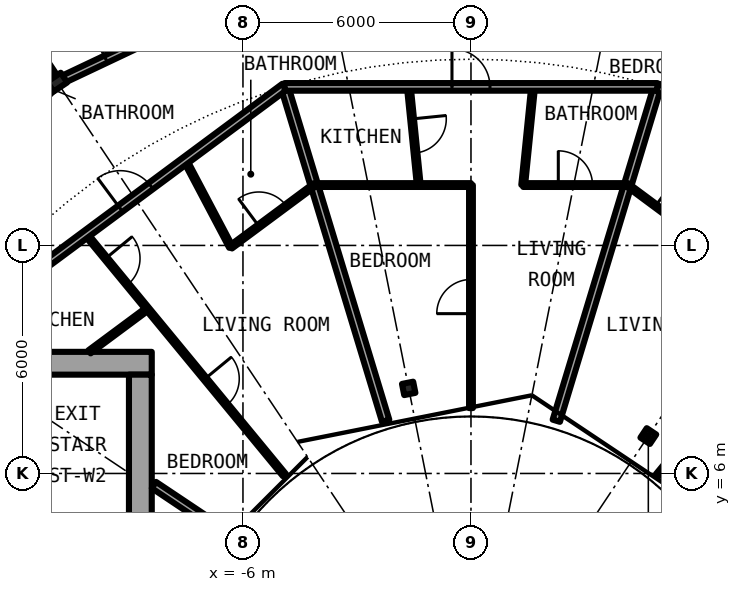
"""IFC4 building model, lengths in metres.
Left out: names, types, materials, properties, quantities, classifications, styles, units other than length and angle.
Written with IfcOpenShell. Run it as: python <this file> out.ifc"""

import sys

from ifc_helpers import new_model, si_unit, direction, frame, frame_2d, origin, origin_2d, place, context, subcontext, project, spatial, rectangle, i_section, extrude, element, fill, save


model = new_model("IFC4")
c1 = context("Model", 3, precision=1e-05, world=origin(), true_north=direction((0.0, 1.0)))
c2 = subcontext(c1, "Body", "Model", "MODEL_VIEW")
j1 = project(units=[si_unit("LENGTHUNIT", "METRE"), si_unit("PLANEANGLEUNIT", "RADIAN")], contexts=[c1])
p1 = place(None, origin())
s1 = spatial("IfcSite", under=j1, at=p1, CompositionType="ELEMENT")
p2 = place(p1, origin())
s2 = spatial("IfcBuilding", under=s1, at=p2, CompositionType="ELEMENT")
p3 = place(p2, frame((0.0, 0.0, 120.8)))
s3 = spatial("IfcBuildingStorey", under=s2, at=p3, CompositionType="ELEMENT", Elevation=120.8)
p4 = place(p3, frame((-10.889, 16.297, 0.0), z_axis=(0.0, 0.0, 1.0), x_axis=(-0.55557023302, 0.831469612303, 0.0)))
e1 = element("IfcColumn", 1, at=p4, inside=s3, PredefinedType="COLUMN", context=c2, shape_type="SweptSolid", body=[
    extrude(i_section(OverallWidth=0.307, OverallDepth=0.432, WebThickness=0.021, FlangeThickness=0.04, FilletRadius=0.027, at=origin_2d()), origin(), (0.0, 0.0, 1.0), 3.05),
])
for number, where, z_axis, x_axis in (
    (2, (4.667, 6.984, 0.0), (0.0, 0.0, 1.0), (0.556, 0.831, 0.0)),
    (3, (-1.639, 8.239, 0.0), (0.0, 0.0, 1.0), (-0.195, 0.981, 0.0)),
):
    element("IfcColumn", number, at=place(p3, frame(where, z_axis=z_axis, x_axis=x_axis)), inside=s3, PredefinedType="COLUMN", context=c2, shape_type="SweptSolid", body=[
        extrude(i_section(OverallWidth=0.3, OverallDepth=0.3, WebThickness=0.011, FlangeThickness=0.019, FilletRadius=0.027, at=origin_2d()), origin(), (0.0, 0.0, 1.0), 3.05),
    ])
p5 = place(p3, frame((-8.4, 8.9, 0.0), z_axis=(0.0, 0.0, 1.0), x_axis=(-1.0, 0.0, 0.0)))
e4 = element("IfcWall", 4, at=p5, inside=s3, PredefinedType="SHEAR", context=c2, shape_type="SweptSolid", body=[
    extrude(rectangle(XDim=13.8, YDim=0.6, at=frame_2d((6.9, 0.0))), origin(), (0.0, 0.0, 1.0), 3.05),
])
p6 = place(p5, frame((11.475, 0.0, 0.0)))
e5 = element("IfcOpeningElement", 5, at=p6, cuts=e4, PredefinedType="OPENING", context=c2, shape_type="SweptSolid", body=[
    extrude(rectangle(XDim=1.2, YDim=2.3, at=frame_2d((0.6, 1.15))), frame((0.0, 0.31, 0.0), z_axis=(0.0, -1.0, 0.0), x_axis=(1.0, 0.0, 0.0)), (0.0, 0.0, 1.0), 0.62),
])
p7 = place(p3, frame((-8.7, 8.6, 0.0), z_axis=(0.0, 0.0, 1.0), x_axis=(0.0, -1.0, 0.0)))
e6 = element("IfcWall", 6, at=p7, inside=s3, PredefinedType="SHEAR", context=c2, shape_type="SweptSolid", body=[
    extrude(rectangle(XDim=17.2, YDim=0.6, at=frame_2d((8.6, 0.0))), origin(), (0.0, 0.0, 1.0), 3.05),
])
p8 = place(p7, frame((7.4, 0.0, 0.1)))
e7 = element("IfcOpeningElement", 7, at=p8, cuts=e6, PredefinedType="OPENING", context=c2, shape_type="SweptSolid", body=[
    extrude(rectangle(XDim=2.4, YDim=2.2, at=frame_2d((1.2, 1.1))), frame((0.0, 0.31, 0.0), z_axis=(0.0, -1.0, 0.0), x_axis=(1.0, 0.0, 0.0)), (0.0, 0.0, 1.0), 0.62),
])
for number, where, z_axis, x_axis in (
    (8, (-4.907, 16.172, 0.0), (0.0, 0.0, 1.0), (0.29, -0.957, 0.0)),
    (9, (2.245, 7.387, 0.0), (0.0, 0.0, 1.0), (0.29, 0.957, 0.0)),
):
    element("IfcWall", number, at=place(p3, frame(where, z_axis=z_axis, x_axis=x_axis)), inside=s3, PredefinedType="PARTITIONING", context=c2, shape_type="SweptSolid", body=[
        extrude(rectangle(XDim=9.18, YDim=0.2, at=frame_2d((4.59, 0.0))), origin(), (0.0, 0.0, 1.0), 2.7),
    ])
p9 = place(p3, frame((-15.097, 22.595, 0.0), z_axis=(0.0, 0.0, 1.0), x_axis=(0.555572791, -0.831467903109, 0.0)))
e10 = element("IfcWall", 10, at=p9, inside=s3, PredefinedType="PARTITIONING", context=c2, shape_type="SweptSolid", body=[
    extrude(rectangle(XDim=7.358, YDim=0.2, at=frame_2d((3.679, 0.0))), origin(), (0.0, 0.0, 1.0), 2.7),
])
p10 = place(p3, frame((-10.132, 12.296, 0.0), z_axis=(0.0, 0.0, 1.0), x_axis=(0.635976043025, -0.771708800454, 0.0)))
e11 = element("IfcWall", 11, at=p10, inside=s3, PredefinedType="PARTITIONING", context=c2, shape_type="SweptSolid", body=[
    extrude(rectangle(XDim=8.213, YDim=0.1, at=frame_2d((4.106, 0.0))), origin(), (0.0, 0.0, 1.0), 2.7),
])
p11 = place(p10, frame((0.823, 0.0, 0.0)))
e12 = element("IfcOpeningElement", 12, at=p11, cuts=e11, PredefinedType="OPENING", context=c2, shape_type="SweptSolid", body=[
    extrude(rectangle(XDim=0.9, YDim=2.3, at=frame_2d((0.45, 1.15))), frame((0.0, 0.06, 0.0), z_axis=(0.0, -1.0, 0.0), x_axis=(1.0, 0.0, 0.0)), (0.0, 0.0, 1.0), 0.12),
])
p12 = place(p10, frame((4.929, 0.0, 0.0)))
e13 = element("IfcOpeningElement", 13, at=p12, cuts=e11, PredefinedType="OPENING", context=c2, shape_type="SweptSolid", body=[
    extrude(rectangle(XDim=0.9, YDim=2.3, at=frame_2d((0.45, 1.15))), frame((0.0, 0.06, 0.0), z_axis=(0.0, -1.0, 0.0), x_axis=(1.0, 0.0, 0.0)), (0.0, 0.0, 1.0), 0.12),
])
p13 = place(p3, frame((-7.519, 14.234, 0.0), z_axis=(0.0, 0.0, 1.0), x_axis=(0.467001992543, -0.884256263173, 0.0)))
e14 = element("IfcWall", 14, at=p13, inside=s3, PredefinedType="PARTITIONING", context=c2, shape_type="SweptSolid", body=[
    extrude(rectangle(XDim=2.572, YDim=0.1, at=frame_2d((1.286, 0.0))), origin(), (0.0, 0.0, 1.0), 2.7),
])
p14 = place(p3, frame((-1.635, 16.172, 0.0), z_axis=(0.0, 0.0, 1.0), x_axis=(0.100527855112, -0.994934244233, 0.0)))
e15 = element("IfcWall", 15, at=p14, inside=s3, PredefinedType="PARTITIONING", context=c2, shape_type="SweptSolid", body=[
    extrude(rectangle(XDim=2.596, YDim=0.1, at=frame_2d((1.298, 0.0))), origin(), (0.0, 0.0, 1.0), 2.7),
])
p15 = place(p14, frame((0.848, 0.0, 0.0)))
e16 = element("IfcOpeningElement", 16, at=p15, cuts=e15, PredefinedType="OPENING", context=c2, shape_type="SweptSolid", body=[
    extrude(rectangle(XDim=0.9, YDim=2.3, at=frame_2d((0.45, 1.15))), frame((0.0, 0.06, 0.0), z_axis=(0.0, -1.0, 0.0), x_axis=(1.0, 0.0, 0.0)), (0.0, 0.0, 1.0), 0.12),
])
p16 = place(p3, frame((0.0, 7.72, 0.0), z_axis=(0.0, 0.0, 1.0), x_axis=(0.0, 1.0, 0.0)))
e17 = element("IfcWall", 17, at=p16, inside=s3, PredefinedType="PARTITIONING", context=c2, shape_type="SweptSolid", body=[
    extrude(rectangle(XDim=5.869, YDim=0.1, at=frame_2d((2.935, 0.0))), origin(), (0.0, 0.0, 1.0), 2.7),
])
p17 = place(p16, frame((2.485, 0.0, 0.0)))
e18 = element("IfcOpeningElement", 18, at=p17, cuts=e17, PredefinedType="OPENING", context=c2, shape_type="SweptSolid", body=[
    extrude(rectangle(XDim=0.9, YDim=2.3, at=frame_2d((0.45, 1.15))), frame((0.0, 0.06, 0.0), z_axis=(0.0, -1.0, 0.0), x_axis=(1.0, 0.0, 0.0)), (0.0, 0.0, 1.0), 0.12),
])
p18 = place(p3, frame((1.374, 13.589, 0.0), z_axis=(0.0, 0.0, 1.0), x_axis=(0.100527855112, 0.994934244233, 0.0)))
e19 = element("IfcWall", 19, at=p18, inside=s3, PredefinedType="PARTITIONING", context=c2, shape_type="SweptSolid", body=[
    extrude(rectangle(XDim=2.596, YDim=0.1, at=frame_2d((1.298, 0.0))), origin(), (0.0, 0.0, 1.0), 2.7),
])
p19 = place(p3, frame((4.909, 5.958, 0.0), z_axis=(0.0, 0.0, 1.0), x_axis=(0.635976043025, 0.771708800454, 0.0)))
e20 = element("IfcWall", 20, at=p19, inside=s3, PredefinedType="PARTITIONING", context=c2, shape_type="SweptSolid", body=[
    extrude(rectangle(XDim=8.213, YDim=0.1, at=frame_2d((4.106, 0.0))), origin(), (0.0, 0.0, 1.0), 2.7),
])
p20 = place(p19, frame((6.49, 0.0, 0.0)))
e21 = element("IfcOpeningElement", 21, at=p20, cuts=e20, PredefinedType="OPENING", context=c2, shape_type="SweptSolid", body=[
    extrude(rectangle(XDim=0.9, YDim=2.3, at=frame_2d((0.45, 1.15))), frame((0.0, 0.06, 0.0), z_axis=(0.0, -1.0, 0.0), x_axis=(1.0, 0.0, 0.0)), (0.0, 0.0, 1.0), 0.12),
])
p21 = place(p19, frame((2.384, 0.0, 0.0)))
e22 = element("IfcOpeningElement", 22, at=p21, cuts=e20, PredefinedType="OPENING", context=c2, shape_type="SweptSolid", body=[
    extrude(rectangle(XDim=0.9, YDim=2.3, at=frame_2d((0.45, 1.15))), frame((0.0, 0.06, 0.0), z_axis=(0.0, -1.0, 0.0), x_axis=(1.0, 0.0, 0.0)), (0.0, 0.0, 1.0), 0.12),
])
p22 = place(p3, frame((-6.513, 4.472, 0.0), z_axis=(0.0, 0.0, 1.0), x_axis=(-0.831333375071, 0.555774072347, 0.0)))
e23 = element("IfcWall", 23, at=p22, inside=s3, PredefinedType="PARTITIONING", context=c2, shape_type="SweptSolid", body=[
    extrude(rectangle(XDim=2.203, YDim=0.2, at=frame_2d((1.101, 0.0))), origin(), (0.0, 0.0, 1.0), 2.7),
])
p23 = place(p3, frame((-10.039, 9.2, 0.0), z_axis=(0.0, 0.0, 1.0), x_axis=(0.803149591038, 0.595777420196, 0.0)))
e24 = element("IfcWall", 24, at=p23, inside=s3, PredefinedType="PARTITIONING", context=c2, shape_type="SweptSolid", body=[
    extrude(rectangle(XDim=1.9, YDim=0.1, at=frame_2d((0.95, 0.0))), origin(), (0.0, 0.0, 1.0), 2.7),
])
p24 = place(p3, frame((-6.318, 11.96, 0.0), z_axis=(0.0, 0.0, 1.0), x_axis=(0.803128348509, 0.595806055542, 0.0)))
e25 = element("IfcWall", 25, at=p24, inside=s3, PredefinedType="PARTITIONING", context=c2, shape_type="SweptSolid", body=[
    extrude(rectangle(XDim=2.734, YDim=0.1, at=frame_2d((1.367, 0.0))), origin(), (0.0, 0.0, 1.0), 2.7),
])
p25 = place(p24, frame((0.917, 0.0, 0.0)))
e26 = element("IfcOpeningElement", 26, at=p25, cuts=e25, PredefinedType="OPENING", context=c2, shape_type="SweptSolid", body=[
    extrude(rectangle(XDim=0.9, YDim=2.3, at=frame_2d((0.45, 1.15))), frame((0.0, 0.06, 0.0), z_axis=(0.0, -1.0, 0.0), x_axis=(1.0, 0.0, 0.0)), (0.0, 0.0, 1.0), 0.12),
])
p26 = place(p3, frame((4.122, 13.589, 0.0), z_axis=(0.0, 0.0, 1.0), x_axis=(0.803128348509, -0.595806055542, 0.0)))
e27 = element("IfcWall", 27, at=p26, inside=s3, PredefinedType="PARTITIONING", context=c2, shape_type="SweptSolid", body=[
    extrude(rectangle(XDim=2.734, YDim=0.1, at=frame_2d((1.367, 0.0))), origin(), (0.0, 0.0, 1.0), 2.7),
])
p27 = place(p26, frame((0.917, 0.0, 0.0)))
e28 = element("IfcOpeningElement", 28, at=p27, cuts=e27, PredefinedType="OPENING", context=c2, shape_type="SweptSolid", body=[
    extrude(rectangle(XDim=0.9, YDim=2.3, at=frame_2d((0.45, 1.15))), frame((0.0, 0.06, 0.0), z_axis=(0.0, -1.0, 0.0), x_axis=(1.0, 0.0, 0.0)), (0.0, 0.0, 1.0), 0.12),
])
p28 = place(p3, frame((-4.122, 13.589, 0.0), z_axis=(0.0, 0.0, 1.0), x_axis=(1.0, 0.0, 0.0)))
e29 = element("IfcWall", 29, at=p28, inside=s3, PredefinedType="PARTITIONING", context=c2, shape_type="SweptSolid", body=[
    extrude(rectangle(XDim=4.122, YDim=0.1, at=frame_2d((2.061, 0.0))), origin(), (0.0, 0.0, 1.0), 2.7),
])
p29 = place(p3, frame((1.374, 13.589, 0.0), z_axis=(0.0, 0.0, 1.0), x_axis=(1.0, 0.0, 0.0)))
e30 = element("IfcWall", 30, at=p29, inside=s3, PredefinedType="PARTITIONING", context=c2, shape_type="SweptSolid", body=[
    extrude(rectangle(XDim=2.748, YDim=0.1, at=frame_2d((1.374, 0.0))), origin(), (0.0, 0.0, 1.0), 2.7),
])
p30 = place(p29, frame((0.924, 0.0, 0.0)))
e31 = element("IfcOpeningElement", 31, at=p30, cuts=e30, PredefinedType="OPENING", context=c2, shape_type="SweptSolid", body=[
    extrude(rectangle(XDim=0.9, YDim=2.3, at=frame_2d((0.45, 1.15))), frame((0.0, 0.06, 0.0), z_axis=(0.0, -1.0, 0.0), x_axis=(1.0, 0.0, 0.0)), (0.0, 0.0, 1.0), 0.12),
])
p31 = place(p3, frame((-14.052, 9.389, 0.0), z_axis=(0.0, 0.0, 1.0), x_axis=(0.803204584823, 0.59570327758, 0.0)))
e32 = element("IfcWall", 32, at=p31, inside=s3, PredefinedType="PARTITIONING", context=c2, shape_type="SweptSolid", body=[
    extrude(rectangle(XDim=11.387, YDim=0.2, at=frame_2d((5.693, 0.0))), origin(), (0.0, 0.0, 1.0), 2.7),
])
p32 = place(p31, frame((6.007, 0.0, 0.0)))
e33 = element("IfcOpeningElement", 33, at=p32, cuts=e32, PredefinedType="OPENING", context=c2, shape_type="SweptSolid", body=[
    extrude(rectangle(XDim=1.0, YDim=2.3, at=frame_2d((0.5, 1.15))), frame((0.0, 0.11, 0.0), z_axis=(0.0, -1.0, 0.0), x_axis=(1.0, 0.0, 0.0)), (0.0, 0.0, 1.0), 0.22),
])
p33 = place(p3, frame((4.906, 16.172, 0.0), z_axis=(0.0, 0.0, 1.0), x_axis=(0.803204584823, -0.59570327758, 0.0)))
e34 = element("IfcWall", 34, at=p33, inside=s3, PredefinedType="PARTITIONING", context=c2, shape_type="SweptSolid", body=[
    extrude(rectangle(XDim=11.387, YDim=0.2, at=frame_2d((5.693, 0.0))), origin(), (0.0, 0.0, 1.0), 2.7),
])
p34 = place(p33, frame((4.38, 0.0, 0.0)))
e35 = element("IfcOpeningElement", 35, at=p34, cuts=e34, PredefinedType="OPENING", context=c2, shape_type="SweptSolid", body=[
    extrude(rectangle(XDim=1.0, YDim=2.3, at=frame_2d((0.5, 1.15))), frame((0.0, 0.11, 0.0), z_axis=(0.0, -1.0, 0.0), x_axis=(1.0, 0.0, 0.0)), (0.0, 0.0, 1.0), 0.22),
])
p35 = place(p3, frame((-4.906, 16.172, 0.0), z_axis=(0.0, 0.0, 1.0), x_axis=(1.0, 0.0, 0.0)))
e36 = element("IfcWall", 36, at=p35, inside=s3, PredefinedType="PARTITIONING", context=c2, shape_type="SweptSolid", body=[
    extrude(rectangle(XDim=9.812, YDim=0.2, at=frame_2d((4.906, 0.0))), origin(), (0.0, 0.0, 1.0), 2.7),
])
p36 = place(p35, frame((4.406, 0.0, 0.0)))
e37 = element("IfcOpeningElement", 37, at=p36, cuts=e36, PredefinedType="OPENING", context=c2, shape_type="SweptSolid", body=[
    extrude(rectangle(XDim=1.0, YDim=2.3, at=frame_2d((0.5, 1.15))), frame((0.0, 0.11, 0.0), z_axis=(0.0, -1.0, 0.0), x_axis=(1.0, 0.0, 0.0)), (0.0, 0.0, 1.0), 0.22),
])
p37 = place(p3, frame((-16.186, 11.0, 0.0), z_axis=(0.0, 0.0, 1.0), x_axis=(0.707106781187, 0.707106781187, 0.0)))
e38 = element("IfcWall", 38, at=p37, inside=s3, PredefinedType="PARTITIONING", context=c2, shape_type="SweptSolid", body=[
    extrude(rectangle(XDim=7.334, YDim=0.2, at=frame_2d((3.667, 0.0))), origin(), (0.0, 0.0, 1.0), 2.39),
])
p38 = place(p37, frame((2.211, 0.0, 0.0)))
e39 = element("IfcOpeningElement", 39, at=p38, cuts=e38, PredefinedType="OPENING", context=c2, shape_type="SweptSolid", body=[
    extrude(rectangle(XDim=1.0, YDim=2.3, at=frame_2d((0.5, 1.15))), frame((0.0, 0.11, 0.0), z_axis=(0.0, -1.0, 0.0), x_axis=(1.0, 0.0, 0.0)), (0.0, 0.0, 1.0), 0.22),
])
p39 = place(p3, frame((-10.748, 16.362, 0.0), z_axis=(0.0, 0.0, 1.0), x_axis=(0.903869270233, 0.427808768409, 0.0)))
e40 = element("IfcWall", 40, at=p39, inside=s3, PredefinedType="PARTITIONING", context=c2, shape_type="SweptSolid", body=[
    extrude(rectangle(XDim=5.596, YDim=0.2, at=frame_2d((2.798, 0.0))), origin(), (0.0, 0.0, 1.0), 2.39),
])
p40 = place(p39, frame((1.262, 0.0, 0.0)))
e41 = element("IfcOpeningElement", 41, at=p40, cuts=e40, PredefinedType="OPENING", context=c2, shape_type="SweptSolid", body=[
    extrude(rectangle(XDim=1.0, YDim=2.3, at=frame_2d((0.5, 1.15))), frame((0.0, 0.11, 0.0), z_axis=(0.0, -1.0, 0.0), x_axis=(1.0, 0.0, 0.0)), (0.0, 0.0, 1.0), 0.22),
])
p41 = place(p40, origin())
e42 = element("IfcDoor", 42, at=p41, inside=s3, OperationType="SINGLE_SWING_LEFT", PredefinedType="DOOR", context=c2, shape_type="SweptSolid", body=[
    extrude(rectangle(XDim=1.0, YDim=2.3, at=frame_2d((0.5, 1.15))), frame((0.0, 0.025, 0.0), z_axis=(0.0, -1.0, 0.0), x_axis=(1.0, 0.0, 0.0)), (0.0, 0.0, 1.0), 0.05),
])
fill(e41, e42)
p42 = place(p27, origin())
e43 = element("IfcDoor", 43, at=p42, inside=s3, OperationType="SINGLE_SWING_LEFT", PredefinedType="DOOR", context=c2, shape_type="SweptSolid", body=[
    extrude(rectangle(XDim=0.9, YDim=2.3, at=frame_2d((0.45, 1.15))), frame((0.0, 0.025, 0.0), z_axis=(0.0, -1.0, 0.0), x_axis=(1.0, 0.0, 0.0)), (0.0, 0.0, 1.0), 0.05),
])
fill(e28, e43)
p43 = place(p36, origin())
e44 = element("IfcDoor", 44, at=p43, inside=s3, OperationType="SINGLE_SWING_LEFT", PredefinedType="DOOR", context=c2, shape_type="SweptSolid", body=[
    extrude(rectangle(XDim=1.0, YDim=2.3, at=frame_2d((0.5, 1.15))), frame((0.0, 0.025, 0.0), z_axis=(0.0, -1.0, 0.0), x_axis=(1.0, 0.0, 0.0)), (0.0, 0.0, 1.0), 0.05),
])
fill(e37, e44)
p44 = place(p30, origin())
e45 = element("IfcDoor", 45, at=p44, inside=s3, OperationType="SINGLE_SWING_RIGHT", PredefinedType="DOOR", context=c2, shape_type="SweptSolid", body=[
    extrude(rectangle(XDim=0.9, YDim=2.3, at=frame_2d((0.45, 1.15))), frame((0.0, 0.025, 0.0), z_axis=(0.0, -1.0, 0.0), x_axis=(1.0, 0.0, 0.0)), (0.0, 0.0, 1.0), 0.05),
])
fill(e31, e45)
p45 = place(p15, origin())
e46 = element("IfcDoor", 46, at=p45, inside=s3, OperationType="SINGLE_SWING_LEFT", PredefinedType="DOOR", context=c2, shape_type="SweptSolid", body=[
    extrude(rectangle(XDim=0.9, YDim=2.3, at=frame_2d((0.45, 1.15))), frame((0.0, 0.025, 0.0), z_axis=(0.0, -1.0, 0.0), x_axis=(1.0, 0.0, 0.0)), (0.0, 0.0, 1.0), 0.05),
])
fill(e16, e46)
p46 = place(p17, origin())
e47 = element("IfcDoor", 47, at=p46, inside=s3, OperationType="SINGLE_SWING_RIGHT", PredefinedType="DOOR", context=c2, shape_type="SweptSolid", body=[
    extrude(rectangle(XDim=0.9, YDim=2.3, at=frame_2d((0.45, 1.15))), frame((0.0, 0.025, 0.0), z_axis=(0.0, -1.0, 0.0), x_axis=(1.0, 0.0, 0.0)), (0.0, 0.0, 1.0), 0.05),
])
fill(e18, e47)
p47 = place(p32, origin())
e48 = element("IfcDoor", 48, at=p47, inside=s3, OperationType="SINGLE_SWING_RIGHT", PredefinedType="DOOR", context=c2, shape_type="SweptSolid", body=[
    extrude(rectangle(XDim=1.0, YDim=2.3, at=frame_2d((0.5, 1.15))), frame((0.0, 0.025, 0.0), z_axis=(0.0, -1.0, 0.0), x_axis=(1.0, 0.0, 0.0)), (0.0, 0.0, 1.0), 0.05),
])
fill(e33, e48)
p48 = place(p25, origin())
e49 = element("IfcDoor", 49, at=p48, inside=s3, OperationType="SINGLE_SWING_RIGHT", PredefinedType="DOOR", context=c2, shape_type="SweptSolid", body=[
    extrude(rectangle(XDim=0.9, YDim=2.3, at=frame_2d((0.45, 1.15))), frame((0.0, 0.025, 0.0), z_axis=(0.0, -1.0, 0.0), x_axis=(1.0, 0.0, 0.0)), (0.0, 0.0, 1.0), 0.05),
])
fill(e26, e49)
p49 = place(p11, origin())
e50 = element("IfcDoor", 50, at=p49, inside=s3, OperationType="SINGLE_SWING_LEFT", PredefinedType="DOOR", context=c2, shape_type="SweptSolid", body=[
    extrude(rectangle(XDim=0.9, YDim=2.3, at=frame_2d((0.45, 1.15))), frame((0.0, 0.025, 0.0), z_axis=(0.0, -1.0, 0.0), x_axis=(1.0, 0.0, 0.0)), (0.0, 0.0, 1.0), 0.05),
])
fill(e12, e50)
p50 = place(p12, origin())
e51 = element("IfcDoor", 51, at=p50, inside=s3, OperationType="SINGLE_SWING_RIGHT", PredefinedType="DOOR", context=c2, shape_type="SweptSolid", body=[
    extrude(rectangle(XDim=0.9, YDim=2.3, at=frame_2d((0.45, 1.15))), frame((0.0, 0.025, 0.0), z_axis=(0.0, -1.0, 0.0), x_axis=(1.0, 0.0, 0.0)), (0.0, 0.0, 1.0), 0.05),
])
fill(e13, e51)
save(model, sys.argv[1])
